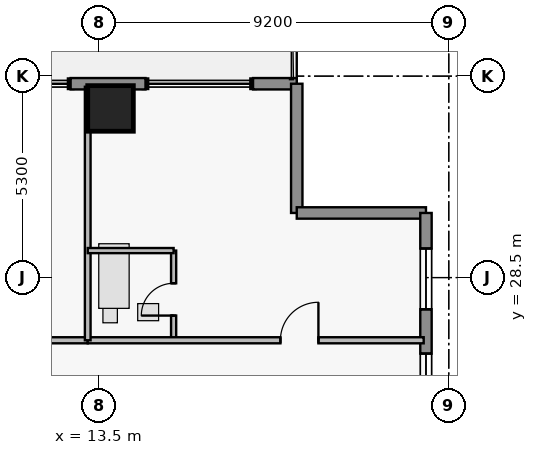
"""IFC4 building model, lengths in metres.
Left out: names, types, materials, properties, quantities, classifications, styles, units other than length and angle.
Written with IfcOpenShell. Run it as: python <this file> out.ifc"""

import sys

from ifc_helpers import new_model, si_unit, direction, frame, frame_2d, origin, origin_2d, place, context, subcontext, project, spatial, rectangle, extrude, element, fill, save


model = new_model("IFC4")
c1 = context("Model", 3, precision=1e-05, world=origin(), true_north=direction((0.0, 1.0)))
c2 = subcontext(c1, "Body", "Model", "MODEL_VIEW")
j1 = project(units=[si_unit("LENGTHUNIT", "METRE"), si_unit("PLANEANGLEUNIT", "RADIAN")], contexts=[c1])
p1 = place(None, origin())
s1 = spatial("IfcSite", under=j1, at=p1, CompositionType="ELEMENT")
p2 = place(p1, origin())
s2 = spatial("IfcBuilding", under=s1, at=p2, CompositionType="ELEMENT")
p3 = place(p2, frame((0.0, 0.0, 203.65)))
s3 = spatial("IfcBuildingStorey", under=s2, at=p3, CompositionType="ELEMENT", Elevation=203.65)
p4 = place(p3, frame((13.8, 32.95, 0.0), z_axis=(0.0, 0.0, 1.0), x_axis=(1.0, 0.0, 0.0)))
e1 = element("IfcColumn", 1, at=p4, inside=s3, PredefinedType="COLUMN", context=c2, shape_type="SweptSolid", body=[
    extrude(rectangle(XDim=1.2, YDim=1.2, at=origin_2d()), origin(), (0.0, 0.0, 1.0), 3.75),
])
p5 = place(p3, frame((12.75, 33.6, 0.0), z_axis=(0.0, 0.0, 1.0), x_axis=(1.0, 0.0, 0.0)))
e2 = element("IfcWall", 2, at=p5, inside=s3, PredefinedType="STANDARD", context=c2, shape_type="SweptSolid", body=[
    extrude(rectangle(XDim=1.97, YDim=0.3, at=frame_2d((0.985, 0.0))), origin(), (0.0, 0.0, 1.0), 3.53),
])
p6 = place(p3, frame((17.55, 33.6, 0.0), z_axis=(0.0, 0.0, 1.0), x_axis=(1.0, 0.0, 0.0)))
e3 = element("IfcWall", 3, at=p6, inside=s3, PredefinedType="STANDARD", context=c2, shape_type="SweptSolid", body=[
    extrude(rectangle(XDim=1.15, YDim=0.3, at=frame_2d((0.575, 0.0))), origin(), (0.0, 0.0, 1.0), 3.53),
])
for number, where, z_axis, x_axis in (
    (4, (18.7, 33.6, 0.0), (0.0, 0.0, 1.0), (0.0, -1.0, 0.0)),
    (5, (18.7, 30.2, 0.0), (0.0, 0.0, 1.0), (1.0, 0.0, 0.0)),
):
    element("IfcWall", number, at=place(p3, frame(where, z_axis=z_axis, x_axis=x_axis)), inside=s3, PredefinedType="STANDARD", context=c2, shape_type="SweptSolid", body=[
        extrude(rectangle(XDim=3.4, YDim=0.3, at=frame_2d((1.7, 0.0))), origin(), (0.0, 0.0, 1.0), 3.53),
    ])
p7 = place(p3, frame((22.1, 30.2, 0.0), z_axis=(0.0, 0.0, 1.0), x_axis=(0.0, -1.0, 0.0)))
e6 = element("IfcWall", 6, at=p7, inside=s3, PredefinedType="STANDARD", context=c2, shape_type="SweptSolid", body=[
    extrude(rectangle(XDim=5.65, YDim=0.3, at=frame_2d((2.825, 0.0))), origin(), (0.0, 0.0, 1.0), 3.53),
])
p8 = place(p7, frame((0.935, 0.0, 0.85)))
e7 = element("IfcOpeningElement", 7, at=p8, cuts=e6, PredefinedType="OPENING", context=c2, shape_type="SweptSolid", body=[
    extrude(rectangle(XDim=1.6, YDim=1.8, at=frame_2d((0.8, 0.9))), frame((0.0, 0.16, 0.0), z_axis=(0.0, -1.0, 0.0), x_axis=(1.0, 0.0, 0.0)), (0.0, 0.0, 1.0), 0.32),
])
p9 = place(p7, frame((3.7, 0.0, 0.95)))
e8 = element("IfcOpeningElement", 8, at=p9, cuts=e6, PredefinedType="OPENING", context=c2, shape_type="SweptSolid", body=[
    extrude(rectangle(XDim=1.15, YDim=1.55, at=frame_2d((0.575, 0.775))), frame((0.0, 0.16, 0.0), z_axis=(0.0, -1.0, 0.0), x_axis=(1.0, 0.0, 0.0)), (0.0, 0.0, 1.0), 0.32),
])
p10 = place(p3, frame((7.8, 26.85, 0.0), z_axis=(0.0, 0.0, 1.0), x_axis=(1.0, 0.0, 0.0)))
e9 = element("IfcWall", 9, at=p10, inside=s3, PredefinedType="PARTITIONING", context=c2, shape_type="SweptSolid", body=[
    extrude(rectangle(XDim=5.4, YDim=0.16, at=frame_2d((2.7, 0.0))), origin(), (0.0, 0.0, 1.0), 3.53),
])
p11 = place(p10, frame((3.375, 0.0, 0.0)))
e10 = element("IfcOpeningElement", 10, at=p11, cuts=e9, PredefinedType="OPENING", context=c2, shape_type="SweptSolid", body=[
    extrude(rectangle(XDim=0.95, YDim=2.15, at=frame_2d((0.475, 1.075))), frame((0.0, 0.09, 0.0), z_axis=(0.0, -1.0, 0.0), x_axis=(1.0, 0.0, 0.0)), (0.0, 0.0, 1.0), 0.18),
])
p12 = place(p3, frame((15.46, 26.85, 0.0), z_axis=(0.0, 0.0, 1.0), x_axis=(0.0, 1.0, 0.0)))
e11 = element("IfcWall", 11, at=p12, inside=s3, PredefinedType="PLUMBINGWALL", context=c2, shape_type="SweptSolid", body=[
    extrude(rectangle(XDim=2.36, YDim=0.135, at=frame_2d((1.18, 0.0))), origin(), (0.0, 0.0, 1.0), 3.53),
])
p13 = place(p12, frame((0.65, 0.0, 0.0)))
e12 = element("IfcOpeningElement", 12, at=p13, cuts=e11, PredefinedType="OPENING", context=c2, shape_type="SweptSolid", body=[
    extrude(rectangle(XDim=0.85, YDim=2.1, at=frame_2d((0.425, 1.05))), frame((0.0, 0.077, 0.0), z_axis=(0.0, -1.0, 0.0), x_axis=(1.0, 0.0, 0.0)), (0.0, 0.0, 1.0), 0.155),
])
p14 = place(p3, frame((13.2, 26.85, 0.0), z_axis=(0.0, 0.0, 1.0), x_axis=(1.0, 0.0, 0.0)))
e13 = element("IfcWall", 13, at=p14, inside=s3, PredefinedType="PARTITIONING", context=c2, shape_type="SweptSolid", body=[
    extrude(rectangle(XDim=8.84, YDim=0.16, at=frame_2d((4.42, 0.0))), origin(), (0.0, 0.0, 1.0), 3.53),
])
p15 = place(p14, frame((5.07, 0.0, 0.0)))
e14 = element("IfcOpeningElement", 14, at=p15, cuts=e13, PredefinedType="OPENING", context=c2, shape_type="SweptSolid", body=[
    extrude(rectangle(XDim=1.0, YDim=2.15, at=frame_2d((0.5, 1.075))), frame((0.0, 0.09, 0.0), z_axis=(0.0, -1.0, 0.0), x_axis=(1.0, 0.0, 0.0)), (0.0, 0.0, 1.0), 0.18),
])
p16 = place(p3, frame((13.2, 26.85, 0.0), z_axis=(0.0, 0.0, 1.0), x_axis=(0.0, 1.0, 0.0)))
e15 = element("IfcWall", 15, at=p16, inside=s3, PredefinedType="PARTITIONING", context=c2, shape_type="SweptSolid", body=[
    extrude(rectangle(XDim=6.67, YDim=0.15, at=frame_2d((3.335, 0.0))), origin(), (0.0, 0.0, 1.0), 3.53),
])
p17 = place(p3, frame((13.2, 29.21, 0.0), z_axis=(0.0, 0.0, 1.0), x_axis=(1.0, 0.0, 0.0)))
e16 = element("IfcWall", 16, at=p17, inside=s3, PredefinedType="PLUMBINGWALL", context=c2, shape_type="SweptSolid", body=[
    extrude(rectangle(XDim=2.26, YDim=0.135, at=frame_2d((1.13, 0.0))), origin(), (0.0, 0.0, 1.0), 3.53),
])
p18 = place(p8, origin())
e17 = element("IfcWindow", 17, at=p18, inside=s3, PartitioningType="SINGLE_PANEL", PredefinedType="WINDOW", context=c2, shape_type="SweptSolid", body=[
    extrude(rectangle(XDim=1.6, YDim=1.8, at=frame_2d((0.8, 0.9))), frame((0.0, 0.03, 0.0), z_axis=(0.0, -1.0, 0.0), x_axis=(1.0, 0.0, 0.0)), (0.0, 0.0, 1.0), 0.06),
])
fill(e7, e17)
p19 = place(p9, origin())
e18 = element("IfcWindow", 18, at=p19, inside=s3, PartitioningType="SINGLE_PANEL", PredefinedType="WINDOW", context=c2, shape_type="SweptSolid", body=[
    extrude(rectangle(XDim=1.15, YDim=1.55, at=frame_2d((0.575, 0.775))), frame((0.0, 0.03, 0.0), z_axis=(0.0, -1.0, 0.0), x_axis=(1.0, 0.0, 0.0)), (0.0, 0.0, 1.0), 0.06),
])
fill(e8, e18)
p20 = place(p13, origin())
e19 = element("IfcDoor", 19, at=p20, inside=s3, OperationType="SINGLE_SWING_LEFT", PredefinedType="DOOR", context=c2, shape_type="SweptSolid", body=[
    extrude(rectangle(XDim=0.85, YDim=2.1, at=frame_2d((0.425, 1.05))), frame((0.0, 0.025, 0.0), z_axis=(0.0, -1.0, 0.0), x_axis=(1.0, 0.0, 0.0)), (0.0, 0.0, 1.0), 0.05),
])
fill(e12, e19)
p21 = place(p15, origin())
e20 = element("IfcDoor", 20, at=p21, inside=s3, OperationType="SINGLE_SWING_RIGHT", PredefinedType="DOOR", context=c2, shape_type="SweptSolid", body=[
    extrude(rectangle(XDim=1.0, YDim=2.15, at=frame_2d((0.5, 1.075))), frame((0.0, 0.025, 0.0), z_axis=(0.0, -1.0, 0.0), x_axis=(1.0, 0.0, 0.0)), (0.0, 0.0, 1.0), 0.05),
])
fill(e14, e20)
save(model, sys.argv[1])
